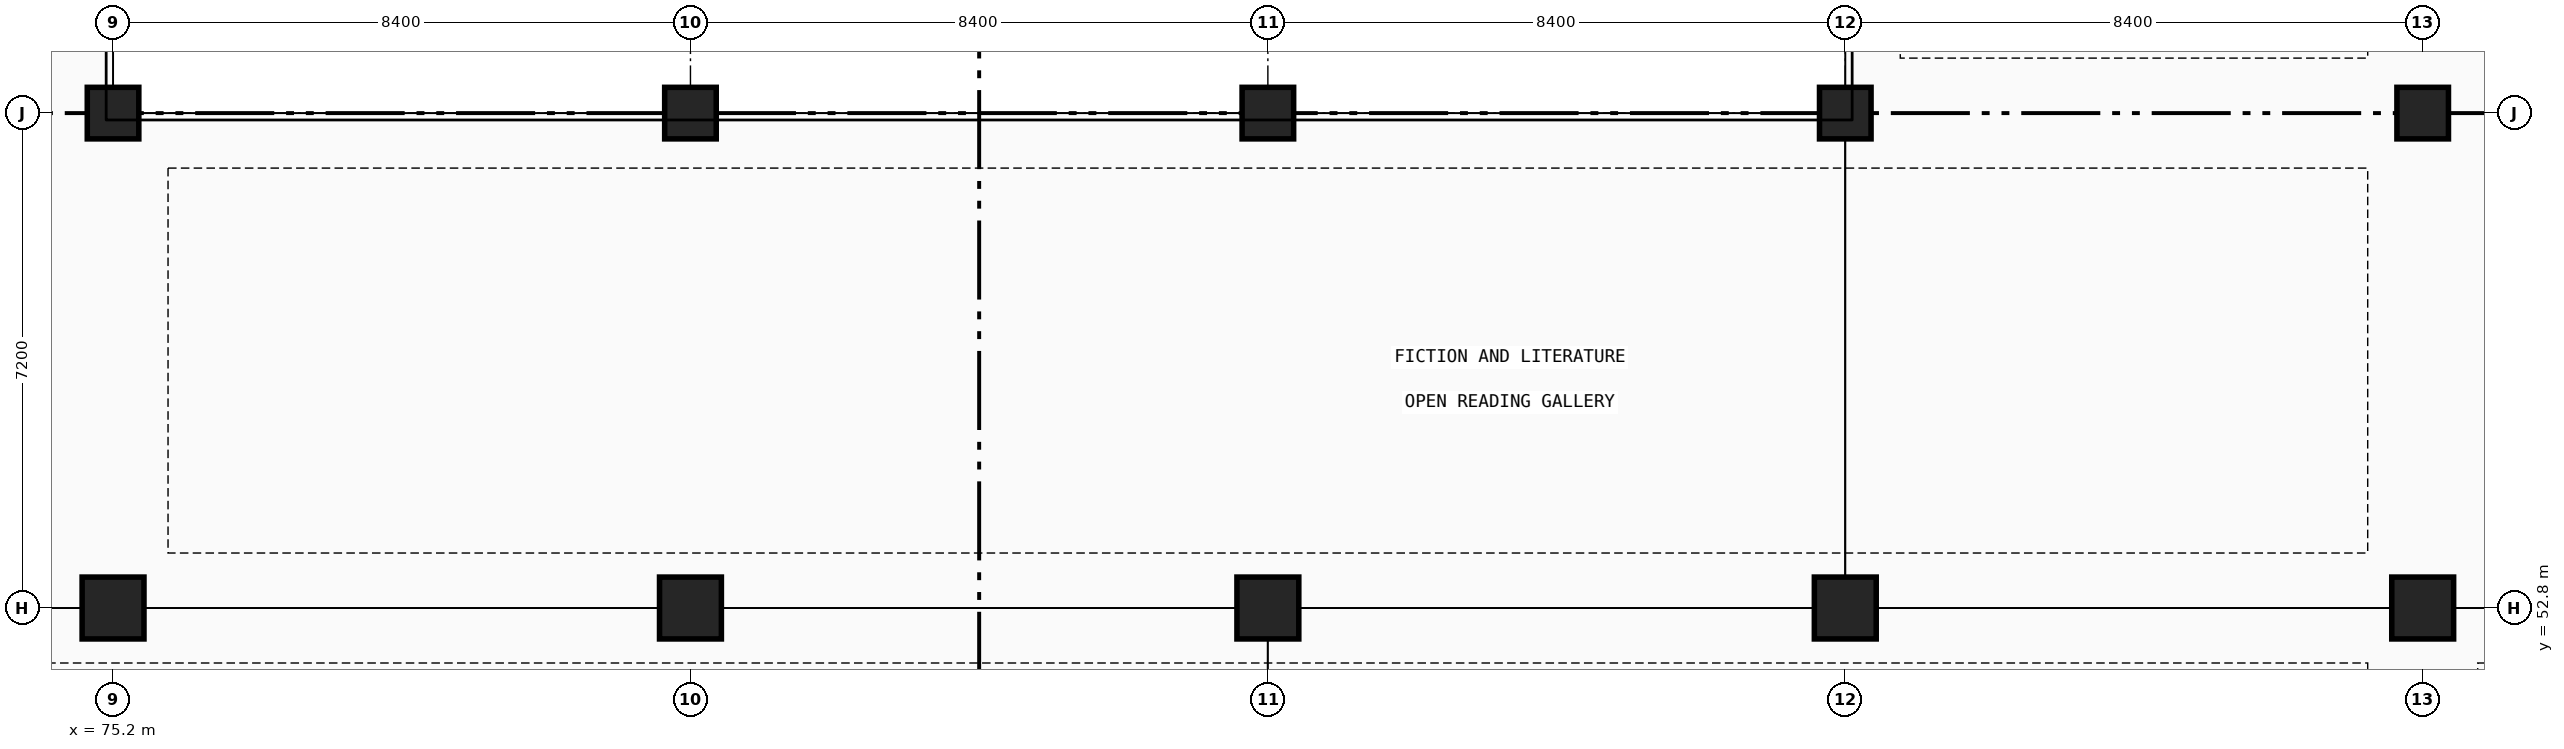
"""IFC4 building model, lengths in metres.
Left out: names, types, materials, properties, quantities, classifications, styles, units other than length and angle.
Written with IfcOpenShell. Run it as: python <this file> out.ifc"""

import sys

from ifc_helpers import new_model, si_unit, direction, frame, origin, origin_2d, place, context, subcontext, project, spatial, rectangle, circle, extrude, element, save


model = new_model("IFC4")
c1 = context("Model", 3, precision=1e-05, world=origin(), true_north=direction((0.0, 1.0)))
c2 = subcontext(c1, "Body", "Model", "MODEL_VIEW")
j1 = project(units=[si_unit("LENGTHUNIT", "METRE"), si_unit("PLANEANGLEUNIT", "RADIAN")], contexts=[c1])
p1 = place(None, origin())
s1 = spatial("IfcSite", under=j1, at=p1, CompositionType="ELEMENT")
p2 = place(p1, origin())
s2 = spatial("IfcBuilding", under=s1, at=p2, CompositionType="ELEMENT")
p3 = place(p2, frame((0.0, 0.0, 4.8)))
s3 = spatial("IfcBuildingStorey", under=s2, at=p3, CompositionType="ELEMENT", Elevation=4.8)
p4 = place(p3, frame((75.2, 52.8, 0.0), z_axis=(0.0, 0.0, 1.0), x_axis=(1.0, 0.0, 0.0)))
e1 = element("IfcColumn", 1, at=p4, inside=s3, PredefinedType="COLUMN", context=c2, shape_type="SweptSolid", body=[
    extrude(rectangle(XDim=0.9, YDim=0.9, at=origin_2d()), origin(), (0.0, 0.0, 1.0), 4.8),
])
p5 = place(p3, frame((75.2, 60.0, 0.0), z_axis=(0.0, 0.0, 1.0), x_axis=(1.0, 0.0, 0.0)))
e2 = element("IfcColumn", 2, at=p5, inside=s3, PredefinedType="COLUMN", context=c2, shape_type="SweptSolid", body=[
    extrude(circle(Radius=0.375, at=origin_2d()), origin(), (0.0, 0.0, 1.0), 4.8),
])
p6 = place(p3, frame((83.6, 52.8, 0.0), z_axis=(0.0, 0.0, 1.0), x_axis=(1.0, 0.0, 0.0)))
e3 = element("IfcColumn", 3, at=p6, inside=s3, PredefinedType="COLUMN", context=c2, shape_type="SweptSolid", body=[
    extrude(rectangle(XDim=0.9, YDim=0.9, at=origin_2d()), origin(), (0.0, 0.0, 1.0), 4.8),
])
p7 = place(p3, frame((83.6, 60.0, 0.0), z_axis=(0.0, 0.0, 1.0), x_axis=(1.0, 0.0, 0.0)))
e4 = element("IfcColumn", 4, at=p7, inside=s3, PredefinedType="COLUMN", context=c2, shape_type="SweptSolid", body=[
    extrude(circle(Radius=0.375, at=origin_2d()), origin(), (0.0, 0.0, 1.0), 4.8),
])
p8 = place(p3, frame((92.0, 52.8, 0.0), z_axis=(0.0, 0.0, 1.0), x_axis=(1.0, 0.0, 0.0)))
e5 = element("IfcColumn", 5, at=p8, inside=s3, PredefinedType="COLUMN", context=c2, shape_type="SweptSolid", body=[
    extrude(rectangle(XDim=0.9, YDim=0.9, at=origin_2d()), origin(), (0.0, 0.0, 1.0), 4.8),
])
p9 = place(p3, frame((92.0, 60.0, 0.0), z_axis=(0.0, 0.0, 1.0), x_axis=(1.0, 0.0, 0.0)))
e6 = element("IfcColumn", 6, at=p9, inside=s3, PredefinedType="COLUMN", context=c2, shape_type="SweptSolid", body=[
    extrude(circle(Radius=0.375, at=origin_2d()), origin(), (0.0, 0.0, 1.0), 4.8),
])
p10 = place(p3, frame((100.4, 52.8, 0.0), z_axis=(0.0, 0.0, 1.0), x_axis=(1.0, 0.0, 0.0)))
e7 = element("IfcColumn", 7, at=p10, inside=s3, PredefinedType="COLUMN", context=c2, shape_type="SweptSolid", body=[
    extrude(rectangle(XDim=0.9, YDim=0.9, at=origin_2d()), origin(), (0.0, 0.0, 1.0), 4.8),
])
p11 = place(p3, frame((100.4, 60.0, 0.0), z_axis=(0.0, 0.0, 1.0), x_axis=(1.0, 0.0, 0.0)))
e8 = element("IfcColumn", 8, at=p11, inside=s3, PredefinedType="COLUMN", context=c2, shape_type="SweptSolid", body=[
    extrude(circle(Radius=0.375, at=origin_2d()), origin(), (0.0, 0.0, 1.0), 4.8),
])
p12 = place(p3, frame((108.8, 52.8, 0.0), z_axis=(0.0, 0.0, 1.0), x_axis=(1.0, 0.0, 0.0)))
e9 = element("IfcColumn", 9, at=p12, inside=s3, PredefinedType="COLUMN", context=c2, shape_type="SweptSolid", body=[
    extrude(rectangle(XDim=0.9, YDim=0.9, at=origin_2d()), origin(), (0.0, 0.0, 1.0), 4.8),
])
p13 = place(p3, frame((108.8, 60.0, 0.0), z_axis=(0.0, 0.0, 1.0), x_axis=(1.0, 0.0, 0.0)))
e10 = element("IfcColumn", 10, at=p13, inside=s3, PredefinedType="COLUMN", context=c2, shape_type="SweptSolid", body=[
    extrude(rectangle(XDim=0.75, YDim=0.75, at=origin_2d()), origin(), (0.0, 0.0, 1.0), 4.8),
])
save(model, sys.argv[1])
